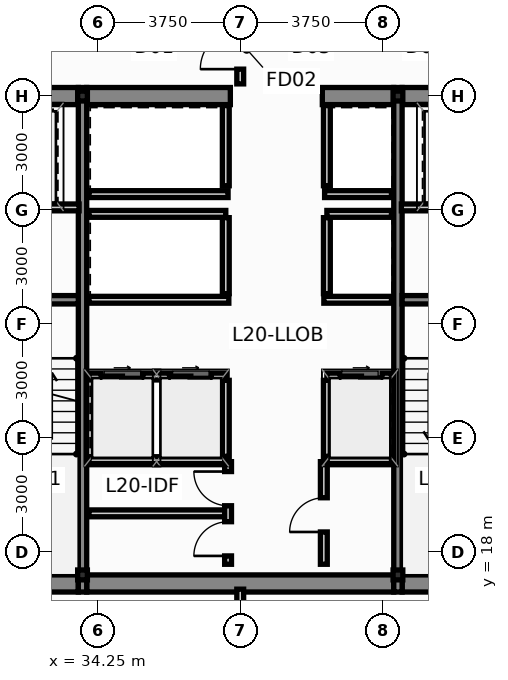
"""IFC4 building model, lengths in metres.
Left out: names, types, materials, properties, quantities, classifications, styles, units other than length and angle.
Written with IfcOpenShell. Run it as: python <this file> out.ifc"""

import sys

from ifc_helpers import new_model, si_unit, direction, frame, frame_2d, origin, origin_2d, place, context, subcontext, project, spatial, rectangle, i_section, extrude, source, transform, mapped, element, fill, save


model = new_model("IFC4")
c1 = context("Model", 3, precision=1e-05, world=origin(), true_north=direction((0.0, 1.0)))
c2 = subcontext(c1, "Body", "Model", "MODEL_VIEW")
j1 = project(units=[si_unit("LENGTHUNIT", "METRE"), si_unit("PLANEANGLEUNIT", "RADIAN")], contexts=[c1])
p1 = place(None, origin())
s1 = spatial("IfcSite", under=j1, at=p1, CompositionType="ELEMENT")
p2 = place(p1, origin())
s2 = spatial("IfcBuilding", under=s1, at=p2, CompositionType="ELEMENT")
p3 = place(p2, frame((0.0, 0.0, 79.85)))
s3 = spatial("IfcBuildingStorey", under=s2, at=p3, CompositionType="ELEMENT", Elevation=79.85)
m1 = source(origin(), c2, "Body", "SweptSolid", [
    extrude(i_section(OverallWidth=0.256, OverallDepth=0.26, WebThickness=0.01, FlangeThickness=0.017, at=origin_2d()), origin(), (0.0, 0.0, 1.0), 3.65),
])
for number, where, z_axis, x_axis in (
    (1, (33.85, 17.4, 0.0), (0.0, 0.0, 1.0), (1.0, 0.0, 0.0)),
    (2, (42.15, 17.4, 0.0), (0.0, 0.0, 1.0), (1.0, 0.0, 0.0)),
    (3, (33.85, 30.0, 0.0), (0.0, 0.0, 1.0), (1.0, 0.0, 0.0)),
    (4, (42.15, 30.0, 0.0), (0.0, 0.0, 1.0), (1.0, 0.0, 0.0)),
):
    element("IfcColumn", number, at=place(p3, frame(where, z_axis=z_axis, x_axis=x_axis)), inside=s3, PredefinedType="COLUMN", context=c2, shape_type="MappedRepresentation", body=[
        mapped(m1, transform((0.0, 0.0, 0.0), scale=1.0)),
    ])
p4 = place(p3, frame((30.84, 17.175, 0.0), z_axis=(0.0, 0.0, 1.0), x_axis=(1.0, 0.0, 0.0)))
e5 = element("IfcWall", 5, at=p4, inside=s3, PredefinedType="SHEAR", context=c2, shape_type="SweptSolid", body=[
    extrude(rectangle(XDim=2.9, YDim=0.45, at=frame_2d((1.45, 0.0))), origin(), (0.0, 0.0, 1.0), 3.65),
])
p5 = place(p3, frame((33.96, 17.175, 0.0), z_axis=(0.0, 0.0, 1.0), x_axis=(1.0, 0.0, 0.0)))
e6 = element("IfcWall", 6, at=p5, inside=s3, PredefinedType="SHEAR", context=c2, shape_type="SweptSolid", body=[
    extrude(rectangle(XDim=8.08, YDim=0.45, at=frame_2d((4.04, 0.0))), origin(), (0.0, 0.0, 1.0), 3.65),
])
for number, where, z_axis, x_axis in (
    (7, (42.26, 17.175, 0.0), (0.0, 0.0, 1.0), (1.0, 0.0, 0.0)),
    (8, (30.84, 30.0, 0.0), (0.0, 0.0, 1.0), (1.0, 0.0, 0.0)),
):
    element("IfcWall", number, at=place(p3, frame(where, z_axis=z_axis, x_axis=x_axis)), inside=s3, PredefinedType="SHEAR", context=c2, shape_type="SweptSolid", body=[
        extrude(rectangle(XDim=2.9, YDim=0.45, at=frame_2d((1.45, 0.0))), origin(), (0.0, 0.0, 1.0), 3.65),
    ])
p6 = place(p3, frame((33.96, 30.0, 0.0), z_axis=(0.0, 0.0, 1.0), x_axis=(1.0, 0.0, 0.0)))
e9 = element("IfcWall", 9, at=p6, inside=s3, PredefinedType="SHEAR", context=c2, shape_type="SweptSolid", body=[
    extrude(rectangle(XDim=3.78, YDim=0.45, at=frame_2d((1.89, 0.0))), origin(), (0.0, 0.0, 1.0), 3.65),
])
p7 = place(p3, frame((40.16, 30.0, 0.0), z_axis=(0.0, 0.0, 1.0), x_axis=(1.0, 0.0, 0.0)))
e10 = element("IfcWall", 10, at=p7, inside=s3, PredefinedType="SHEAR", context=c2, shape_type="SweptSolid", body=[
    extrude(rectangle(XDim=1.88, YDim=0.45, at=frame_2d((0.94, 0.0))), origin(), (0.0, 0.0, 1.0), 3.65),
])
p8 = place(p3, frame((42.26, 30.0, 0.0), z_axis=(0.0, 0.0, 1.0), x_axis=(1.0, 0.0, 0.0)))
e11 = element("IfcWall", 11, at=p8, inside=s3, PredefinedType="SHEAR", context=c2, shape_type="SweptSolid", body=[
    extrude(rectangle(XDim=2.9, YDim=0.45, at=frame_2d((1.45, 0.0))), origin(), (0.0, 0.0, 1.0), 3.65),
])
for number, where, z_axis, x_axis in (
    (12, (33.85, 16.95, 0.0), (0.0, 0.0, 1.0), (0.0, 1.0, 0.0)),
    (13, (42.15, 16.95, 0.0), (0.0, 0.0, 1.0), (0.0, 1.0, 0.0)),
):
    element("IfcWall", number, at=place(p3, frame(where, z_axis=z_axis, x_axis=x_axis)), inside=s3, PredefinedType="SHEAR", context=c2, shape_type="SweptSolid", body=[
        extrude(rectangle(XDim=13.275, YDim=0.22, at=frame_2d((6.638, 0.0))), origin(), (0.0, 0.0, 1.0), 3.65),
    ])
for number, where, z_axis, x_axis in (
    (14, (30.84, 24.64, 0.0), (0.0, 0.0, 1.0), (1.0, 0.0, 0.0)),
    (15, (42.26, 24.64, 0.0), (0.0, 0.0, 1.0), (1.0, 0.0, 0.0)),
):
    element("IfcWall", number, at=place(p3, frame(where, z_axis=z_axis, x_axis=x_axis)), inside=s3, PredefinedType="SHEAR", context=c2, shape_type="SweptSolid", body=[
        extrude(rectangle(XDim=2.9, YDim=0.22, at=frame_2d((1.45, 0.0))), origin(), (0.0, 0.0, 1.0), 3.65),
    ])
p9 = place(p3, frame((34.02, 22.62, 0.0), z_axis=(0.0, 0.0, 1.0), x_axis=(1.0, 0.0, 0.0)))
e16 = element("IfcWall", 16, at=p9, inside=s3, PredefinedType="PARTITIONING", context=c2, shape_type="SweptSolid", body=[
    extrude(rectangle(XDim=3.6, YDim=0.18, at=frame_2d((1.8, 0.0))), origin(), (0.0, 0.0, 1.0), 3.4),
])
p10 = place(p9, frame((0.32, 0.0, 0.0)))
e17 = element("IfcOpeningElement", 17, at=p10, cuts=e16, PredefinedType="OPENING", context=c2, shape_type="SweptSolid", body=[
    extrude(rectangle(XDim=1.1, YDim=2.2, at=frame_2d((0.55, 1.1))), frame((0.0, 0.102, 0.0), z_axis=(0.0, -1.0, 0.0), x_axis=(1.0, 0.0, 0.0)), (0.0, 0.0, 1.0), 0.204),
])
p11 = place(p9, frame((2.12, 0.0, 0.0)))
e18 = element("IfcOpeningElement", 18, at=p11, cuts=e16, PredefinedType="OPENING", context=c2, shape_type="SweptSolid", body=[
    extrude(rectangle(XDim=1.1, YDim=2.2, at=frame_2d((0.55, 1.1))), frame((0.0, 0.102, 0.0), z_axis=(0.0, -1.0, 0.0), x_axis=(1.0, 0.0, 0.0)), (0.0, 0.0, 1.0), 0.204),
])
p12 = place(p3, frame((40.28, 22.62, 0.0), z_axis=(0.0, 0.0, 1.0), x_axis=(1.0, 0.0, 0.0)))
e19 = element("IfcWall", 19, at=p12, inside=s3, PredefinedType="PARTITIONING", context=c2, shape_type="SweptSolid", body=[
    extrude(rectangle(XDim=1.7, YDim=0.18, at=frame_2d((0.85, 0.0))), origin(), (0.0, 0.0, 1.0), 3.4),
])
p13 = place(p12, frame((0.35, 0.0, 0.0)))
e20 = element("IfcOpeningElement", 20, at=p13, cuts=e19, PredefinedType="OPENING", context=c2, shape_type="SweptSolid", body=[
    extrude(rectangle(XDim=1.1, YDim=2.2, at=frame_2d((0.55, 1.1))), frame((0.0, 0.102, 0.0), z_axis=(0.0, -1.0, 0.0), x_axis=(1.0, 0.0, 0.0)), (0.0, 0.0, 1.0), 0.204),
])
for number, where, z_axis, x_axis in (
    (21, (37.62, 20.52, 0.0), (0.0, 0.0, 1.0), (0.0, 1.0, 0.0)),
    (22, (40.28, 20.52, 0.0), (0.0, 0.0, 1.0), (0.0, 1.0, 0.0)),
):
    element("IfcWall", number, at=place(p3, frame(where, z_axis=z_axis, x_axis=x_axis)), inside=s3, PredefinedType="PARTITIONING", context=c2, shape_type="SweptSolid", body=[
        extrude(rectangle(XDim=2.0, YDim=0.18, at=frame_2d((1.0, 0.0))), origin(), (0.0, 0.0, 1.0), 3.4),
    ])
p14 = place(p3, frame((34.02, 26.9, 0.0), z_axis=(0.0, 0.0, 1.0), x_axis=(1.0, 0.0, 0.0)))
e23 = element("IfcWall", 23, at=p14, inside=s3, PredefinedType="PARTITIONING", context=c2, shape_type="SweptSolid", body=[
    extrude(rectangle(XDim=3.6, YDim=0.18, at=frame_2d((1.8, 0.0))), origin(), (0.0, 0.0, 1.0), 3.4),
])
p15 = place(p3, frame((40.28, 26.9, 0.0), z_axis=(0.0, 0.0, 1.0), x_axis=(1.0, 0.0, 0.0)))
e24 = element("IfcWall", 24, at=p15, inside=s3, PredefinedType="PARTITIONING", context=c2, shape_type="SweptSolid", body=[
    extrude(rectangle(XDim=1.7, YDim=0.18, at=frame_2d((0.85, 0.0))), origin(), (0.0, 0.0, 1.0), 3.4),
])
for number, where, z_axis, x_axis in (
    (25, (37.62, 24.8, 0.0), (0.0, 0.0, 1.0), (0.0, 1.0, 0.0)),
    (26, (40.28, 24.8, 0.0), (0.0, 0.0, 1.0), (0.0, 1.0, 0.0)),
):
    element("IfcWall", number, at=place(p3, frame(where, z_axis=z_axis, x_axis=x_axis)), inside=s3, PredefinedType="PARTITIONING", context=c2, shape_type="SweptSolid", body=[
        extrude(rectangle(XDim=2.0, YDim=0.18, at=frame_2d((1.0, 0.0))), origin(), (0.0, 0.0, 1.0), 3.4),
    ])
p16 = place(p3, frame((34.02, 24.64, 0.0), z_axis=(0.0, 0.0, 1.0), x_axis=(1.0, 0.0, 0.0)))
e27 = element("IfcWall", 27, at=p16, inside=s3, PredefinedType="PARTITIONING", context=c2, shape_type="SweptSolid", body=[
    extrude(rectangle(XDim=3.68, YDim=0.18, at=frame_2d((1.84, 0.0))), origin(), (0.0, 0.0, 1.0), 3.4),
])
p17 = place(p3, frame((40.2, 24.64, 0.0), z_axis=(0.0, 0.0, 1.0), x_axis=(1.0, 0.0, 0.0)))
e28 = element("IfcWall", 28, at=p17, inside=s3, PredefinedType="PARTITIONING", context=c2, shape_type="SweptSolid", body=[
    extrude(rectangle(XDim=1.78, YDim=0.18, at=frame_2d((0.89, 0.0))), origin(), (0.0, 0.0, 1.0), 3.4),
])
p18 = place(p3, frame((34.02, 27.42, 0.0), z_axis=(0.0, 0.0, 1.0), x_axis=(1.0, 0.0, 0.0)))
e29 = element("IfcWall", 29, at=p18, inside=s3, PredefinedType="PARTITIONING", context=c2, shape_type="SweptSolid", body=[
    extrude(rectangle(XDim=3.66, YDim=0.18, at=frame_2d((1.83, 0.0))), origin(), (0.0, 0.0, 1.0), 3.4),
])
p19 = place(p3, frame((40.22, 27.42, 0.0), z_axis=(0.0, 0.0, 1.0), x_axis=(1.0, 0.0, 0.0)))
e30 = element("IfcWall", 30, at=p19, inside=s3, PredefinedType="PARTITIONING", context=c2, shape_type="SweptSolid", body=[
    extrude(rectangle(XDim=1.76, YDim=0.18, at=frame_2d((0.88, 0.0))), origin(), (0.0, 0.0, 1.0), 3.4),
])
for number, where, z_axis, x_axis in (
    (31, (37.62, 27.64, 0.0), (0.0, 0.0, 1.0), (0.0, 1.0, 0.0)),
    (32, (40.28, 27.64, 0.0), (0.0, 0.0, 1.0), (0.0, 1.0, 0.0)),
):
    element("IfcWall", number, at=place(p3, frame(where, z_axis=z_axis, x_axis=x_axis)), inside=s3, PredefinedType="PARTITIONING", context=c2, shape_type="SweptSolid", body=[
        extrude(rectangle(XDim=2.11, YDim=0.18, at=frame_2d((1.055, 0.0))), origin(), (0.0, 0.0, 1.0), 3.4),
    ])
for number, where, z_axis, x_axis in (
    (33, (30.86, 27.07, 0.0), (0.0, 0.0, 1.0), (1.0, 0.0, 0.0)),
    (34, (42.24, 27.07, 0.0), (0.0, 0.0, 1.0), (1.0, 0.0, 0.0)),
):
    element("IfcWall", number, at=place(p3, frame(where, z_axis=z_axis, x_axis=x_axis)), inside=s3, PredefinedType="PARTITIONING", context=c2, shape_type="SweptSolid", body=[
        extrude(rectangle(XDim=2.9, YDim=0.18, at=frame_2d((1.45, 0.0))), origin(), (0.0, 0.0, 1.0), 3.4),
    ])
p20 = place(p3, frame((34.02, 20.42, 0.0), z_axis=(0.0, 0.0, 1.0), x_axis=(1.0, 0.0, 0.0)))
e35 = element("IfcWall", 35, at=p20, inside=s3, PredefinedType="PARTITIONING", context=c2, shape_type="SweptSolid", body=[
    extrude(rectangle(XDim=3.64, YDim=0.18, at=frame_2d((1.82, 0.0))), origin(), (0.0, 0.0, 1.0), 3.4),
])
p21 = place(p3, frame((40.22, 20.42, 0.0), z_axis=(0.0, 0.0, 1.0), x_axis=(1.0, 0.0, 0.0)))
e36 = element("IfcWall", 36, at=p21, inside=s3, PredefinedType="PARTITIONING", context=c2, shape_type="SweptSolid", body=[
    extrude(rectangle(XDim=1.76, YDim=0.18, at=frame_2d((0.88, 0.0))), origin(), (0.0, 0.0, 1.0), 3.4),
])
p22 = place(p3, frame((34.02, 19.02, 0.0), z_axis=(0.0, 0.0, 1.0), x_axis=(1.0, 0.0, 0.0)))
e37 = element("IfcWall", 37, at=p22, inside=s3, PredefinedType="PARTITIONING", context=c2, shape_type="SweptSolid", body=[
    extrude(rectangle(XDim=3.58, YDim=0.18, at=frame_2d((1.79, 0.0))), origin(), (0.0, 0.0, 1.0), 3.4),
])
p23 = place(p3, frame((37.68, 17.68, 0.0), z_axis=(0.0, 0.0, 1.0), x_axis=(0.0, 1.0, 0.0)))
e38 = element("IfcWall", 38, at=p23, inside=s3, PredefinedType="PARTITIONING", context=c2, shape_type="SweptSolid", body=[
    extrude(rectangle(XDim=2.7, YDim=0.18, at=frame_2d((1.35, 0.0))), origin(), (0.0, 0.0, 1.0), 3.4),
])
p24 = place(p23, frame((0.22, 0.0, 0.0)))
e39 = element("IfcOpeningElement", 39, at=p24, cuts=e38, PredefinedType="OPENING", context=c2, shape_type="SweptSolid", body=[
    extrude(rectangle(XDim=0.9, YDim=2.1, at=frame_2d((0.45, 1.05))), frame((0.0, 0.102, 0.0), z_axis=(0.0, -1.0, 0.0), x_axis=(1.0, 0.0, 0.0)), (0.0, 0.0, 1.0), 0.204),
])
p25 = place(p23, frame((1.54, 0.0, 0.0)))
e40 = element("IfcOpeningElement", 40, at=p25, cuts=e38, PredefinedType="OPENING", context=c2, shape_type="SweptSolid", body=[
    extrude(rectangle(XDim=0.9, YDim=2.1, at=frame_2d((0.45, 1.05))), frame((0.0, 0.102, 0.0), z_axis=(0.0, -1.0, 0.0), x_axis=(1.0, 0.0, 0.0)), (0.0, 0.0, 1.0), 0.204),
])
p26 = place(p3, frame((40.2, 17.68, 0.0), z_axis=(0.0, 0.0, 1.0), x_axis=(0.0, 1.0, 0.0)))
e41 = element("IfcWall", 41, at=p26, inside=s3, PredefinedType="PARTITIONING", context=c2, shape_type="SweptSolid", body=[
    extrude(rectangle(XDim=2.7, YDim=0.18, at=frame_2d((1.35, 0.0))), origin(), (0.0, 0.0, 1.0), 3.4),
])
p27 = place(p26, frame((0.85, 0.0, 0.0)))
e42 = element("IfcOpeningElement", 42, at=p27, cuts=e41, PredefinedType="OPENING", context=c2, shape_type="SweptSolid", body=[
    extrude(rectangle(XDim=0.9, YDim=2.1, at=frame_2d((0.45, 1.05))), frame((0.0, 0.102, 0.0), z_axis=(0.0, -1.0, 0.0), x_axis=(1.0, 0.0, 0.0)), (0.0, 0.0, 1.0), 0.204),
])
p28 = place(p3, frame((38.0, 15.205, 0.0), z_axis=(0.0, 0.0, 1.0), x_axis=(0.0, 1.0, 0.0)))
e43 = element("IfcWall", 43, at=p28, inside=s3, PredefinedType="PARTITIONING", context=c2, shape_type="SweptSolid", body=[
    extrude(rectangle(XDim=1.82, YDim=0.18, at=frame_2d((0.91, 0.0))), origin(), (0.0, 0.0, 1.0), 3.4),
])
p29 = place(p28, frame((0.385, 0.0, 0.0)))
e44 = element("IfcOpeningElement", 44, at=p29, cuts=e43, PredefinedType="OPENING", context=c2, shape_type="SweptSolid", body=[
    extrude(rectangle(XDim=1.05, YDim=2.15, at=frame_2d((0.525, 1.075))), frame((0.0, 0.102, 0.0), z_axis=(0.0, -1.0, 0.0), x_axis=(1.0, 0.0, 0.0)), (0.0, 0.0, 1.0), 0.204),
])
p30 = place(p3, frame((38.0, 30.32, 0.0), z_axis=(0.0, 0.0, 1.0), x_axis=(0.0, 1.0, 0.0)))
e45 = element("IfcWall", 45, at=p30, inside=s3, PredefinedType="PARTITIONING", context=c2, shape_type="SweptSolid", body=[
    extrude(rectangle(XDim=1.825, YDim=0.18, at=frame_2d((0.913, 0.0))), origin(), (0.0, 0.0, 1.0), 3.4),
])
p31 = place(p30, frame((0.388, 0.0, 0.0)))
e46 = element("IfcOpeningElement", 46, at=p31, cuts=e45, PredefinedType="OPENING", context=c2, shape_type="SweptSolid", body=[
    extrude(rectangle(XDim=1.05, YDim=2.15, at=frame_2d((0.525, 1.075))), frame((0.0, 0.102, 0.0), z_axis=(0.0, -1.0, 0.0), x_axis=(1.0, 0.0, 0.0)), (0.0, 0.0, 1.0), 0.204),
])
p32 = place(p10, origin())
e47 = element("IfcDoor", 47, at=p32, inside=s3, OperationType="SLIDING_TO_LEFT", PredefinedType="DOOR", context=c2, shape_type="SweptSolid", body=[
    extrude(rectangle(XDim=1.1, YDim=2.2, at=frame_2d((0.55, 1.1))), frame((0.0, 0.025, 0.0), z_axis=(0.0, -1.0, 0.0), x_axis=(1.0, 0.0, 0.0)), (0.0, 0.0, 1.0), 0.05),
])
fill(e17, e47)
p33 = place(p11, origin())
e48 = element("IfcDoor", 48, at=p33, inside=s3, OperationType="SLIDING_TO_RIGHT", PredefinedType="DOOR", context=c2, shape_type="SweptSolid", body=[
    extrude(rectangle(XDim=1.1, YDim=2.2, at=frame_2d((0.55, 1.1))), frame((0.0, 0.025, 0.0), z_axis=(0.0, -1.0, 0.0), x_axis=(1.0, 0.0, 0.0)), (0.0, 0.0, 1.0), 0.05),
])
fill(e18, e48)
p34 = place(p13, origin())
e49 = element("IfcDoor", 49, at=p34, inside=s3, OperationType="SLIDING_TO_LEFT", PredefinedType="DOOR", context=c2, shape_type="SweptSolid", body=[
    extrude(rectangle(XDim=1.1, YDim=2.2, at=frame_2d((0.55, 1.1))), frame((0.0, 0.025, 0.0), z_axis=(0.0, -1.0, 0.0), x_axis=(1.0, 0.0, 0.0)), (0.0, 0.0, 1.0), 0.05),
])
fill(e20, e49)
p35 = place(p24, origin())
e50 = element("IfcDoor", 50, at=p35, inside=s3, OperationType="SINGLE_SWING_LEFT", PredefinedType="DOOR", context=c2, shape_type="SweptSolid", body=[
    extrude(rectangle(XDim=0.9, YDim=2.1, at=frame_2d((0.45, 1.05))), frame((0.0, 0.025, 0.0), z_axis=(0.0, -1.0, 0.0), x_axis=(1.0, 0.0, 0.0)), (0.0, 0.0, 1.0), 0.05),
])
fill(e39, e50)
p36 = place(p25, origin())
e51 = element("IfcDoor", 51, at=p36, inside=s3, OperationType="SINGLE_SWING_RIGHT", PredefinedType="DOOR", context=c2, shape_type="SweptSolid", body=[
    extrude(rectangle(XDim=0.9, YDim=2.1, at=frame_2d((0.45, 1.05))), frame((0.0, 0.025, 0.0), z_axis=(0.0, -1.0, 0.0), x_axis=(1.0, 0.0, 0.0)), (0.0, 0.0, 1.0), 0.05),
])
fill(e40, e51)
p37 = place(p27, origin())
e52 = element("IfcDoor", 52, at=p37, inside=s3, OperationType="SINGLE_SWING_LEFT", PredefinedType="DOOR", context=c2, shape_type="SweptSolid", body=[
    extrude(rectangle(XDim=0.9, YDim=2.1, at=frame_2d((0.45, 1.05))), frame((0.0, 0.025, 0.0), z_axis=(0.0, -1.0, 0.0), x_axis=(1.0, 0.0, 0.0)), (0.0, 0.0, 1.0), 0.05),
])
fill(e42, e52)
p38 = place(p31, origin())
e53 = element("IfcDoor", 53, at=p38, inside=s3, OperationType="SINGLE_SWING_LEFT", PredefinedType="DOOR", context=c2, shape_type="SweptSolid", body=[
    extrude(rectangle(XDim=1.05, YDim=2.15, at=frame_2d((0.525, 1.075))), frame((0.0, 0.025, 0.0), z_axis=(0.0, -1.0, 0.0), x_axis=(1.0, 0.0, 0.0)), (0.0, 0.0, 1.0), 0.05),
])
fill(e46, e53)
save(model, sys.argv[1])
